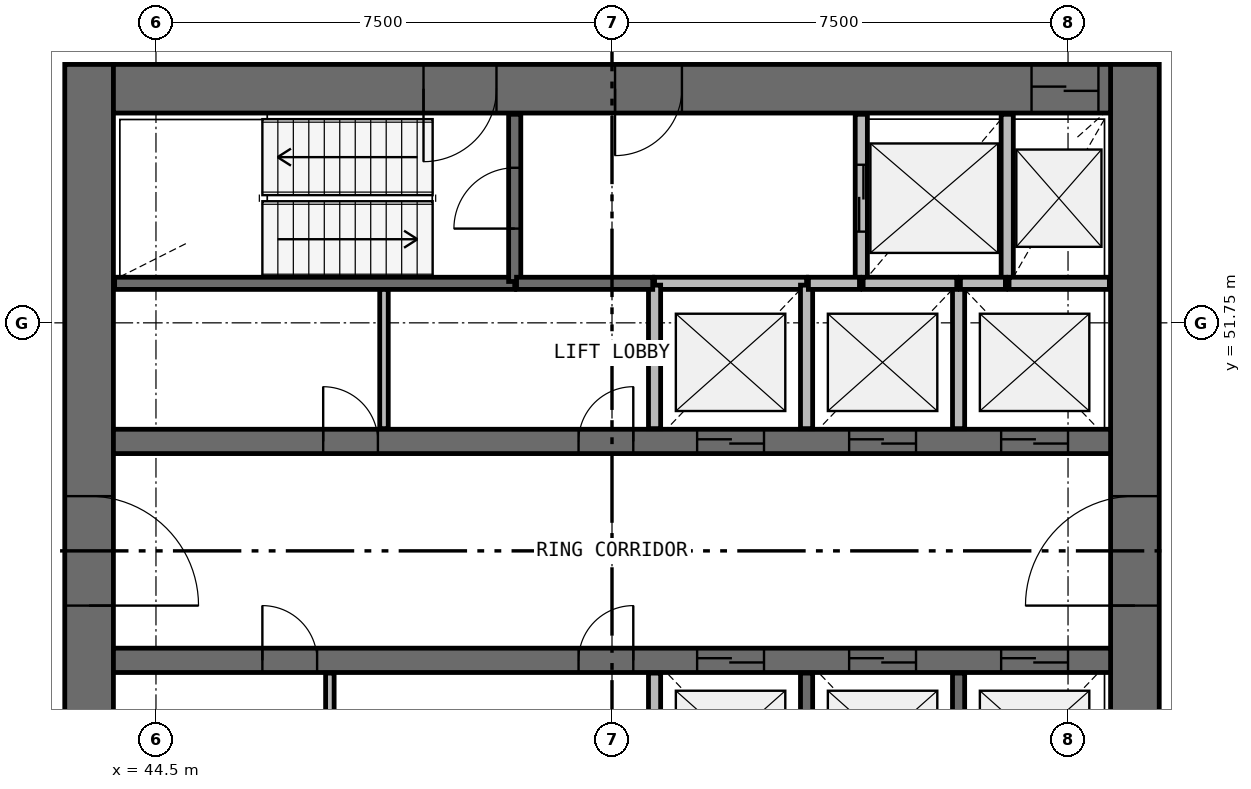
"""IFC4 building model, lengths in metres.
Left out: names, types, materials, properties, quantities, classifications, styles, units other than length and angle.
Written with IfcOpenShell. Run it as: python <this file> out.ifc"""

import sys

from ifc_helpers import new_model, si_unit, direction, frame, frame_2d, origin, place, context, subcontext, project, spatial, rectangle, extrude, source, transform, mapped, element, fill, save


model = new_model("IFC4")
c1 = context("Model", 3, precision=1e-05, world=origin(), true_north=direction((0.0, 1.0)))
c2 = subcontext(c1, "Body", "Model", "MODEL_VIEW")
j1 = project(units=[si_unit("LENGTHUNIT", "METRE"), si_unit("PLANEANGLEUNIT", "RADIAN")], contexts=[c1])
p1 = place(None, origin())
s1 = spatial("IfcSite", under=j1, at=p1, CompositionType="ELEMENT")
p2 = place(p1, origin())
s2 = spatial("IfcBuilding", under=s1, at=p2, CompositionType="ELEMENT")
p3 = place(p2, frame((0.0, 0.0, 160.4)))
s3 = spatial("IfcBuildingStorey", under=s2, at=p3, CompositionType="ELEMENT", Elevation=160.4)
p4 = place(p3, frame((60.6, 40.0, 0.0), z_axis=(0.0, 0.0, 1.0), x_axis=(0.0, 1.0, 0.0)))
e1 = element("IfcWall", 1, at=p4, inside=s3, PredefinedType="SHEAR", context=c2, shape_type="SweptSolid", body=[
    extrude(rectangle(XDim=16.0, YDim=0.8, at=frame_2d((8.0, 0.0))), origin(), (0.0, 0.0, 1.0), 3.9),
])
p5 = place(p4, frame((7.1, 0.0, 0.0)))
e2 = element("IfcOpeningElement", 2, at=p5, cuts=e1, PredefinedType="OPENING", context=c2, shape_type="SweptSolid", body=[
    extrude(rectangle(XDim=1.8, YDim=2.1, at=frame_2d((0.9, 1.05))), frame((0.0, 0.41, 0.0), z_axis=(0.0, -1.0, 0.0), x_axis=(1.0, 0.0, 0.0)), (0.0, 0.0, 1.0), 0.82),
])
p6 = place(p3, frame((43.4, 56.0, 0.0), z_axis=(0.0, 0.0, 1.0), x_axis=(0.0, -1.0, 0.0)))
e3 = element("IfcWall", 3, at=p6, inside=s3, PredefinedType="SHEAR", context=c2, shape_type="SweptSolid", body=[
    extrude(rectangle(XDim=16.0, YDim=0.8, at=frame_2d((8.0, 0.0))), origin(), (0.0, 0.0, 1.0), 3.9),
])
p7 = place(p6, frame((7.1, 0.0, 0.0)))
e4 = element("IfcOpeningElement", 4, at=p7, cuts=e3, PredefinedType="OPENING", context=c2, shape_type="SweptSolid", body=[
    extrude(rectangle(XDim=1.8, YDim=2.1, at=frame_2d((0.9, 1.05))), frame((0.0, 0.41, 0.0), z_axis=(0.0, -1.0, 0.0), x_axis=(1.0, 0.0, 0.0)), (0.0, 0.0, 1.0), 0.82),
])
p8 = place(p3, frame((60.2, 55.6, 0.0), z_axis=(0.0, 0.0, 1.0), x_axis=(-1.0, 0.0, 0.0)))
e5 = element("IfcWall", 5, at=p8, inside=s3, PredefinedType="SHEAR", context=c2, shape_type="SweptSolid", body=[
    extrude(rectangle(XDim=16.4, YDim=0.8, at=frame_2d((8.2, 0.0))), origin(), (0.0, 0.0, 1.0), 3.9),
])
p9 = place(p8, frame((0.2, 0.0, 0.0)))
e6 = element("IfcOpeningElement", 6, at=p9, cuts=e5, PredefinedType="OPENING", context=c2, shape_type="SweptSolid", body=[
    extrude(rectangle(XDim=1.1, YDim=2.1, at=frame_2d((0.55, 1.05))), frame((0.0, 0.41, 0.0), z_axis=(0.0, -1.0, 0.0), x_axis=(1.0, 0.0, 0.0)), (0.0, 0.0, 1.0), 0.82),
])
p10 = place(p8, frame((10.1, 0.0, 0.0)))
e7 = element("IfcOpeningElement", 7, at=p10, cuts=e5, PredefinedType="OPENING", context=c2, shape_type="SweptSolid", body=[
    extrude(rectangle(XDim=1.2, YDim=2.1, at=frame_2d((0.6, 1.05))), frame((0.0, 0.41, 0.0), z_axis=(0.0, -1.0, 0.0), x_axis=(1.0, 0.0, 0.0)), (0.0, 0.0, 1.0), 0.82),
])
p11 = place(p8, frame((7.05, 0.0, 0.0)))
e8 = element("IfcOpeningElement", 8, at=p11, cuts=e5, PredefinedType="OPENING", context=c2, shape_type="SweptSolid", body=[
    extrude(rectangle(XDim=1.1, YDim=2.1, at=frame_2d((0.55, 1.05))), frame((0.0, 0.41, 0.0), z_axis=(0.0, -1.0, 0.0), x_axis=(1.0, 0.0, 0.0)), (0.0, 0.0, 1.0), 0.82),
])
p12 = place(p3, frame((43.8, 49.8, 0.0), z_axis=(0.0, 0.0, 1.0), x_axis=(1.0, 0.0, 0.0)))
e9 = element("IfcWall", 9, at=p12, inside=s3, PredefinedType="SHEAR", context=c2, shape_type="SweptSolid", body=[
    extrude(rectangle(XDim=16.4, YDim=0.4, at=frame_2d((8.2, 0.0))), origin(), (0.0, 0.0, 1.0), 3.9),
])
p13 = place(p12, frame((9.6, 0.0, 0.0)))
e10 = element("IfcOpeningElement", 10, at=p13, cuts=e9, PredefinedType="OPENING", context=c2, shape_type="SweptSolid", body=[
    extrude(rectangle(XDim=1.1, YDim=2.1, at=frame_2d((0.55, 1.05))), frame((0.0, 0.21, 0.0), z_axis=(0.0, -1.0, 0.0), x_axis=(1.0, 0.0, 0.0)), (0.0, 0.0, 1.0), 0.42),
])
p14 = place(p12, frame((12.1, 0.0, 0.0)))
e11 = element("IfcOpeningElement", 11, at=p14, cuts=e9, PredefinedType="OPENING", context=c2, shape_type="SweptSolid", body=[
    extrude(rectangle(XDim=1.1, YDim=2.1, at=frame_2d((0.55, 1.05))), frame((0.0, 0.21, 0.0), z_axis=(0.0, -1.0, 0.0), x_axis=(1.0, 0.0, 0.0)), (0.0, 0.0, 1.0), 0.42),
])
p15 = place(p12, frame((14.6, 0.0, 0.0)))
e12 = element("IfcOpeningElement", 12, at=p15, cuts=e9, PredefinedType="OPENING", context=c2, shape_type="SweptSolid", body=[
    extrude(rectangle(XDim=1.1, YDim=2.1, at=frame_2d((0.55, 1.05))), frame((0.0, 0.21, 0.0), z_axis=(0.0, -1.0, 0.0), x_axis=(1.0, 0.0, 0.0)), (0.0, 0.0, 1.0), 0.42),
])
p16 = place(p12, frame((3.45, 0.0, 0.0)))
e13 = element("IfcOpeningElement", 13, at=p16, cuts=e9, PredefinedType="OPENING", context=c2, shape_type="SweptSolid", body=[
    extrude(rectangle(XDim=0.9, YDim=2.1, at=frame_2d((0.45, 1.05))), frame((0.0, 0.21, 0.0), z_axis=(0.0, -1.0, 0.0), x_axis=(1.0, 0.0, 0.0)), (0.0, 0.0, 1.0), 0.42),
])
p17 = place(p12, frame((7.65, 0.0, 0.0)))
e14 = element("IfcOpeningElement", 14, at=p17, cuts=e9, PredefinedType="OPENING", context=c2, shape_type="SweptSolid", body=[
    extrude(rectangle(XDim=0.9, YDim=2.1, at=frame_2d((0.45, 1.05))), frame((0.0, 0.21, 0.0), z_axis=(0.0, -1.0, 0.0), x_axis=(1.0, 0.0, 0.0)), (0.0, 0.0, 1.0), 0.42),
])
p18 = place(p3, frame((43.8, 46.2, 0.0), z_axis=(0.0, 0.0, 1.0), x_axis=(1.0, 0.0, 0.0)))
e15 = element("IfcWall", 15, at=p18, inside=s3, PredefinedType="SHEAR", context=c2, shape_type="SweptSolid", body=[
    extrude(rectangle(XDim=16.4, YDim=0.4, at=frame_2d((8.2, 0.0))), origin(), (0.0, 0.0, 1.0), 3.9),
])
p19 = place(p18, frame((9.6, 0.0, 0.0)))
e16 = element("IfcOpeningElement", 16, at=p19, cuts=e15, PredefinedType="OPENING", context=c2, shape_type="SweptSolid", body=[
    extrude(rectangle(XDim=1.1, YDim=2.1, at=frame_2d((0.55, 1.05))), frame((0.0, 0.21, 0.0), z_axis=(0.0, -1.0, 0.0), x_axis=(1.0, 0.0, 0.0)), (0.0, 0.0, 1.0), 0.42),
])
p20 = place(p18, frame((12.1, 0.0, 0.0)))
e17 = element("IfcOpeningElement", 17, at=p20, cuts=e15, PredefinedType="OPENING", context=c2, shape_type="SweptSolid", body=[
    extrude(rectangle(XDim=1.1, YDim=2.1, at=frame_2d((0.55, 1.05))), frame((0.0, 0.21, 0.0), z_axis=(0.0, -1.0, 0.0), x_axis=(1.0, 0.0, 0.0)), (0.0, 0.0, 1.0), 0.42),
])
p21 = place(p18, frame((14.6, 0.0, 0.0)))
e18 = element("IfcOpeningElement", 18, at=p21, cuts=e15, PredefinedType="OPENING", context=c2, shape_type="SweptSolid", body=[
    extrude(rectangle(XDim=1.1, YDim=2.1, at=frame_2d((0.55, 1.05))), frame((0.0, 0.21, 0.0), z_axis=(0.0, -1.0, 0.0), x_axis=(1.0, 0.0, 0.0)), (0.0, 0.0, 1.0), 0.42),
])
p22 = place(p18, frame((2.45, 0.0, 0.0)))
e19 = element("IfcOpeningElement", 19, at=p22, cuts=e15, PredefinedType="OPENING", context=c2, shape_type="SweptSolid", body=[
    extrude(rectangle(XDim=0.9, YDim=2.1, at=frame_2d((0.45, 1.05))), frame((0.0, 0.21, 0.0), z_axis=(0.0, -1.0, 0.0), x_axis=(1.0, 0.0, 0.0)), (0.0, 0.0, 1.0), 0.42),
])
p23 = place(p18, frame((7.65, 0.0, 0.0)))
e20 = element("IfcOpeningElement", 20, at=p23, cuts=e15, PredefinedType="OPENING", context=c2, shape_type="SweptSolid", body=[
    extrude(rectangle(XDim=0.9, YDim=2.1, at=frame_2d((0.45, 1.05))), frame((0.0, 0.21, 0.0), z_axis=(0.0, -1.0, 0.0), x_axis=(1.0, 0.0, 0.0)), (0.0, 0.0, 1.0), 0.42),
])
p24 = place(p3, frame((43.82, 52.4, 0.0), z_axis=(0.0, 0.0, 1.0), x_axis=(1.0, 0.0, 0.0)))
e21 = element("IfcWall", 21, at=p24, inside=s3, PredefinedType="SOLIDWALL", context=c2, shape_type="SweptSolid", body=[
    extrude(rectangle(XDim=6.58, YDim=0.2, at=frame_2d((3.29, 0.0))), origin(), (0.0, 0.0, 1.0), 3.58),
])
p25 = place(p3, frame((50.4, 52.43, 0.0), z_axis=(0.0, 0.0, 1.0), x_axis=(0.0, 1.0, 0.0)))
e22 = element("IfcWall", 22, at=p25, inside=s3, PredefinedType="SOLIDWALL", context=c2, shape_type="SweptSolid", body=[
    extrude(rectangle(XDim=2.75, YDim=0.2, at=frame_2d((1.375, 0.0))), origin(), (0.0, 0.0, 1.0), 3.58),
])
p26 = place(p25, frame((0.87, 0.0, 0.0)))
e23 = element("IfcOpeningElement", 23, at=p26, cuts=e22, PredefinedType="OPENING", context=c2, shape_type="SweptSolid", body=[
    extrude(rectangle(XDim=1.0, YDim=2.1, at=frame_2d((0.5, 1.05))), frame((0.0, 0.11, 0.0), z_axis=(0.0, -1.0, 0.0), x_axis=(1.0, 0.0, 0.0)), (0.0, 0.0, 1.0), 0.22),
])
p27 = place(p3, frame((56.1, 55.18, 0.0), z_axis=(0.0, 0.0, 1.0), x_axis=(0.0, -1.0, 0.0)))
e24 = element("IfcWall", 24, at=p27, inside=s3, PredefinedType="SOLIDWALL", context=c2, shape_type="SweptSolid", body=[
    extrude(rectangle(XDim=2.78, YDim=0.2, at=frame_2d((1.39, 0.0))), origin(), (0.0, 0.0, 1.0), 3.58),
])
p28 = place(p27, frame((0.83, 0.0, 0.0)))
e25 = element("IfcOpeningElement", 25, at=p28, cuts=e24, PredefinedType="OPENING", context=c2, shape_type="SweptSolid", body=[
    extrude(rectangle(XDim=1.1, YDim=2.1, at=frame_2d((0.55, 1.05))), frame((0.0, 0.11, 0.0), z_axis=(0.0, -1.0, 0.0), x_axis=(1.0, 0.0, 0.0)), (0.0, 0.0, 1.0), 0.22),
])
p29 = place(p3, frame((58.5, 52.4, 0.0), z_axis=(0.0, 0.0, 1.0), x_axis=(0.0, 1.0, 0.0)))
e26 = element("IfcWall", 26, at=p29, inside=s3, PredefinedType="SOLIDWALL", context=c2, shape_type="SweptSolid", body=[
    extrude(rectangle(XDim=2.78, YDim=0.2, at=frame_2d((1.39, 0.0))), origin(), (0.0, 0.0, 1.0), 3.58),
])
p30 = place(p3, frame((55.2, 52.4, 0.0), z_axis=(0.0, 0.0, 1.0), x_axis=(-1.0, 0.0, 0.0)))
e27 = element("IfcWall", 27, at=p30, inside=s3, PredefinedType="SOLIDWALL", context=c2, shape_type="SweptSolid", body=[
    extrude(rectangle(XDim=2.5, YDim=0.2, at=frame_2d((1.25, 0.0))), origin(), (0.0, 0.0, 1.0), 3.58),
])
for number, where, z_axis, x_axis in (
    (28, (52.7, 45.99, 0.0), (0.0, 0.0, 1.0), (0.0, -1.0, 0.0)),
    (29, (52.7, 52.37, 0.0), (0.0, 0.0, 1.0), (0.0, -1.0, 0.0)),
    (30, (55.2, 43.63, 0.0), (0.0, 0.0, 1.0), (0.0, 1.0, 0.0)),
    (31, (55.2, 50.01, 0.0), (0.0, 0.0, 1.0), (0.0, 1.0, 0.0)),
    (32, (57.7, 43.63, 0.0), (0.0, 0.0, 1.0), (0.0, 1.0, 0.0)),
):
    element("IfcWall", number, at=place(p3, frame(where, z_axis=z_axis, x_axis=x_axis)), inside=s3, PredefinedType="SOLIDWALL", context=c2, shape_type="SweptSolid", body=[
        extrude(rectangle(XDim=2.36, YDim=0.2, at=frame_2d((1.18, 0.0))), origin(), (0.0, 0.0, 1.0), 3.58),
    ])
p31 = place(p3, frame((57.7, 50.01, 0.0), z_axis=(0.0, 0.0, 1.0), x_axis=(0.0, 1.0, 0.0)))
e33 = element("IfcWall", 33, at=p31, inside=s3, PredefinedType="SOLIDWALL", context=c2, shape_type="SweptSolid", body=[
    extrude(rectangle(XDim=2.39, YDim=0.2, at=frame_2d((1.195, 0.0))), origin(), (0.0, 0.0, 1.0), 3.58),
])
p32 = place(p3, frame((50.43, 52.4, 0.0), z_axis=(0.0, 0.0, 1.0), x_axis=(1.0, 0.0, 0.0)))
e34 = element("IfcWall", 34, at=p32, inside=s3, PredefinedType="SOLIDWALL", context=c2, shape_type="SweptSolid", body=[
    extrude(rectangle(XDim=2.24, YDim=0.2, at=frame_2d((1.12, 0.0))), origin(), (0.0, 0.0, 1.0), 3.58),
])
p33 = place(p3, frame((60.18, 52.4, 0.0), z_axis=(0.0, 0.0, 1.0), x_axis=(-1.0, 0.0, 0.0)))
e35 = element("IfcWall", 35, at=p33, inside=s3, PredefinedType="SOLIDWALL", context=c2, shape_type="SweptSolid", body=[
    extrude(rectangle(XDim=1.65, YDim=0.2, at=frame_2d((0.825, 0.0))), origin(), (0.0, 0.0, 1.0), 3.58),
])
p34 = place(p3, frame((57.67, 52.4, 0.0), z_axis=(0.0, 0.0, 1.0), x_axis=(-1.0, 0.0, 0.0)))
e36 = element("IfcWall", 36, at=p34, inside=s3, PredefinedType="SOLIDWALL", context=c2, shape_type="SweptSolid", body=[
    extrude(rectangle(XDim=1.54, YDim=0.2, at=frame_2d((0.77, 0.0))), origin(), (0.0, 0.0, 1.0), 3.58),
])
p35 = place(p3, frame((56.07, 52.4, 0.0), z_axis=(0.0, 0.0, 1.0), x_axis=(-1.0, 0.0, 0.0)))
e37 = element("IfcWall", 37, at=p35, inside=s3, PredefinedType="SOLIDWALL", context=c2, shape_type="SweptSolid", body=[
    extrude(rectangle(XDim=0.84, YDim=0.2, at=frame_2d((0.42, 0.0))), origin(), (0.0, 0.0, 1.0), 3.58),
])
p36 = place(p3, frame((58.47, 52.4, 0.0), z_axis=(0.0, 0.0, 1.0), x_axis=(-1.0, 0.0, 0.0)))
e38 = element("IfcWall", 38, at=p36, inside=s3, PredefinedType="SOLIDWALL", context=c2, shape_type="SweptSolid", body=[
    extrude(rectangle(XDim=0.74, YDim=0.2, at=frame_2d((0.37, 0.0))), origin(), (0.0, 0.0, 1.0), 3.58),
])
for number, where, z_axis, x_axis in (
    (39, (47.36, 43.7, 0.0), (0.0, 0.0, 1.0), (0.0, 1.0, 0.0)),
    (40, (48.25, 50.01, 0.0), (0.0, 0.0, 1.0), (0.0, 1.0, 0.0)),
):
    element("IfcWall", number, at=place(p3, frame(where, z_axis=z_axis, x_axis=x_axis)), inside=s3, PredefinedType="PARTITIONING", context=c2, shape_type="SweptSolid", body=[
        extrude(rectangle(XDim=2.29, YDim=0.14, at=frame_2d((1.145, 0.0))), origin(), (0.0, 0.0, 1.0), 2.88),
    ])
m1 = source(origin(), c2, "Body", "SweptSolid", [
    extrude(rectangle(XDim=1.8, YDim=2.1, at=frame_2d((0.9, 1.05))), frame((0.0, 0.025, 0.0), z_axis=(0.0, -1.0, 0.0), x_axis=(1.0, 0.0, 0.0)), (0.0, 0.0, 1.0), 0.05),
])
p37 = place(p7, origin())
e41 = element("IfcDoor", 41, at=p37, inside=s3, OperationType="SINGLE_SWING_RIGHT", PredefinedType="DOOR", context=c2, shape_type="MappedRepresentation", body=[
    mapped(m1, transform((0.0, 0.0, 0.0), scale=1.0)),
])
fill(e4, e41)
p38 = place(p5, origin())
e42 = element("IfcDoor", 42, at=p38, inside=s3, OperationType="SINGLE_SWING_LEFT", PredefinedType="DOOR", context=c2, shape_type="MappedRepresentation", body=[
    mapped(m1, transform((0.0, 0.0, 0.0), scale=1.0)),
])
fill(e2, e42)
m2 = source(origin(), c2, "Body", "SweptSolid", [
    extrude(rectangle(XDim=1.1, YDim=2.1, at=frame_2d((0.55, 1.05))), frame((0.0, 0.025, 0.0), z_axis=(0.0, -1.0, 0.0), x_axis=(1.0, 0.0, 0.0)), (0.0, 0.0, 1.0), 0.05),
])
p39 = place(p13, origin())
e43 = element("IfcDoor", 43, at=p39, inside=s3, OperationType="DOUBLE_DOOR_SLIDING", PredefinedType="USERDEFINED", context=c2, shape_type="MappedRepresentation", body=[
    mapped(m2, transform((0.0, 0.0, 0.0), scale=1.0)),
])
fill(e10, e43)
p40 = place(p14, origin())
e44 = element("IfcDoor", 44, at=p40, inside=s3, OperationType="DOUBLE_DOOR_SLIDING", PredefinedType="USERDEFINED", context=c2, shape_type="MappedRepresentation", body=[
    mapped(m2, transform((0.0, 0.0, 0.0), scale=1.0)),
])
fill(e11, e44)
p41 = place(p15, origin())
e45 = element("IfcDoor", 45, at=p41, inside=s3, OperationType="DOUBLE_DOOR_SLIDING", PredefinedType="USERDEFINED", context=c2, shape_type="MappedRepresentation", body=[
    mapped(m2, transform((0.0, 0.0, 0.0), scale=1.0)),
])
fill(e12, e45)
p42 = place(p19, origin())
e46 = element("IfcDoor", 46, at=p42, inside=s3, OperationType="DOUBLE_DOOR_SLIDING", PredefinedType="USERDEFINED", context=c2, shape_type="MappedRepresentation", body=[
    mapped(m2, transform((0.0, 0.0, 0.0), scale=1.0)),
])
fill(e16, e46)
p43 = place(p20, origin())
e47 = element("IfcDoor", 47, at=p43, inside=s3, OperationType="DOUBLE_DOOR_SLIDING", PredefinedType="USERDEFINED", context=c2, shape_type="MappedRepresentation", body=[
    mapped(m2, transform((0.0, 0.0, 0.0), scale=1.0)),
])
fill(e17, e47)
p44 = place(p21, origin())
e48 = element("IfcDoor", 48, at=p44, inside=s3, OperationType="DOUBLE_DOOR_SLIDING", PredefinedType="USERDEFINED", context=c2, shape_type="MappedRepresentation", body=[
    mapped(m2, transform((0.0, 0.0, 0.0), scale=1.0)),
])
fill(e18, e48)
p45 = place(p28, origin())
e49 = element("IfcDoor", 49, at=p45, inside=s3, OperationType="DOUBLE_DOOR_SLIDING", PredefinedType="USERDEFINED", context=c2, shape_type="MappedRepresentation", body=[
    mapped(m2, transform((0.0, 0.0, 0.0), scale=1.0)),
])
fill(e25, e49)
p46 = place(p9, origin())
e50 = element("IfcDoor", 50, at=p46, inside=s3, OperationType="DOUBLE_DOOR_SLIDING", PredefinedType="USERDEFINED", context=c2, shape_type="MappedRepresentation", body=[
    mapped(m2, transform((0.0, 0.0, 0.0), scale=1.0)),
])
fill(e6, e50)
m3 = source(origin(), c2, "Body", "SweptSolid", [
    extrude(rectangle(XDim=1.2, YDim=2.1, at=frame_2d((0.6, 1.05))), frame((0.0, 0.025, 0.0), z_axis=(0.0, -1.0, 0.0), x_axis=(1.0, 0.0, 0.0)), (0.0, 0.0, 1.0), 0.05),
])
p47 = place(p10, origin())
e51 = element("IfcDoor", 51, at=p47, inside=s3, OperationType="SINGLE_SWING_RIGHT", PredefinedType="DOOR", context=c2, shape_type="MappedRepresentation", body=[
    mapped(m3, transform((0.0, 0.0, 0.0), scale=1.0)),
])
fill(e7, e51)
m4 = source(origin(), c2, "Body", "SweptSolid", [
    extrude(rectangle(XDim=1.0, YDim=2.1, at=frame_2d((0.5, 1.05))), frame((0.0, 0.025, 0.0), z_axis=(0.0, -1.0, 0.0), x_axis=(1.0, 0.0, 0.0)), (0.0, 0.0, 1.0), 0.05),
])
p48 = place(p26, origin())
e52 = element("IfcDoor", 52, at=p48, inside=s3, OperationType="SINGLE_SWING_LEFT", PredefinedType="DOOR", context=c2, shape_type="MappedRepresentation", body=[
    mapped(m4, transform((0.0, 0.0, 0.0), scale=1.0)),
])
fill(e23, e52)
m5 = source(origin(), c2, "Body", "SweptSolid", [
    extrude(rectangle(XDim=1.1, YDim=2.1, at=frame_2d((0.55, 1.05))), frame((0.0, 0.025, 0.0), z_axis=(0.0, -1.0, 0.0), x_axis=(1.0, 0.0, 0.0)), (0.0, 0.0, 1.0), 0.05),
])
p49 = place(p11, origin())
e53 = element("IfcDoor", 53, at=p49, inside=s3, OperationType="SINGLE_SWING_RIGHT", PredefinedType="DOOR", context=c2, shape_type="MappedRepresentation", body=[
    mapped(m5, transform((0.0, 0.0, 0.0), scale=1.0)),
])
fill(e8, e53)
m6 = source(origin(), c2, "Body", "SweptSolid", [
    extrude(rectangle(XDim=0.9, YDim=2.1, at=frame_2d((0.45, 1.05))), frame((0.0, 0.025, 0.0), z_axis=(0.0, -1.0, 0.0), x_axis=(1.0, 0.0, 0.0)), (0.0, 0.0, 1.0), 0.05),
])
p50 = place(p16, origin())
e54 = element("IfcDoor", 54, at=p50, inside=s3, OperationType="SINGLE_SWING_LEFT", PredefinedType="DOOR", context=c2, shape_type="MappedRepresentation", body=[
    mapped(m6, transform((0.0, 0.0, 0.0), scale=1.0)),
])
fill(e13, e54)
p51 = place(p17, origin())
e55 = element("IfcDoor", 55, at=p51, inside=s3, OperationType="SINGLE_SWING_RIGHT", PredefinedType="DOOR", context=c2, shape_type="MappedRepresentation", body=[
    mapped(m6, transform((0.0, 0.0, 0.0), scale=1.0)),
])
fill(e14, e55)
p52 = place(p22, origin())
e56 = element("IfcDoor", 56, at=p52, inside=s3, OperationType="SINGLE_SWING_LEFT", PredefinedType="DOOR", context=c2, shape_type="MappedRepresentation", body=[
    mapped(m6, transform((0.0, 0.0, 0.0), scale=1.0)),
])
fill(e19, e56)
p53 = place(p23, origin())
e57 = element("IfcDoor", 57, at=p53, inside=s3, OperationType="SINGLE_SWING_RIGHT", PredefinedType="DOOR", context=c2, shape_type="MappedRepresentation", body=[
    mapped(m6, transform((0.0, 0.0, 0.0), scale=1.0)),
])
fill(e20, e57)
save(model, sys.argv[1])
